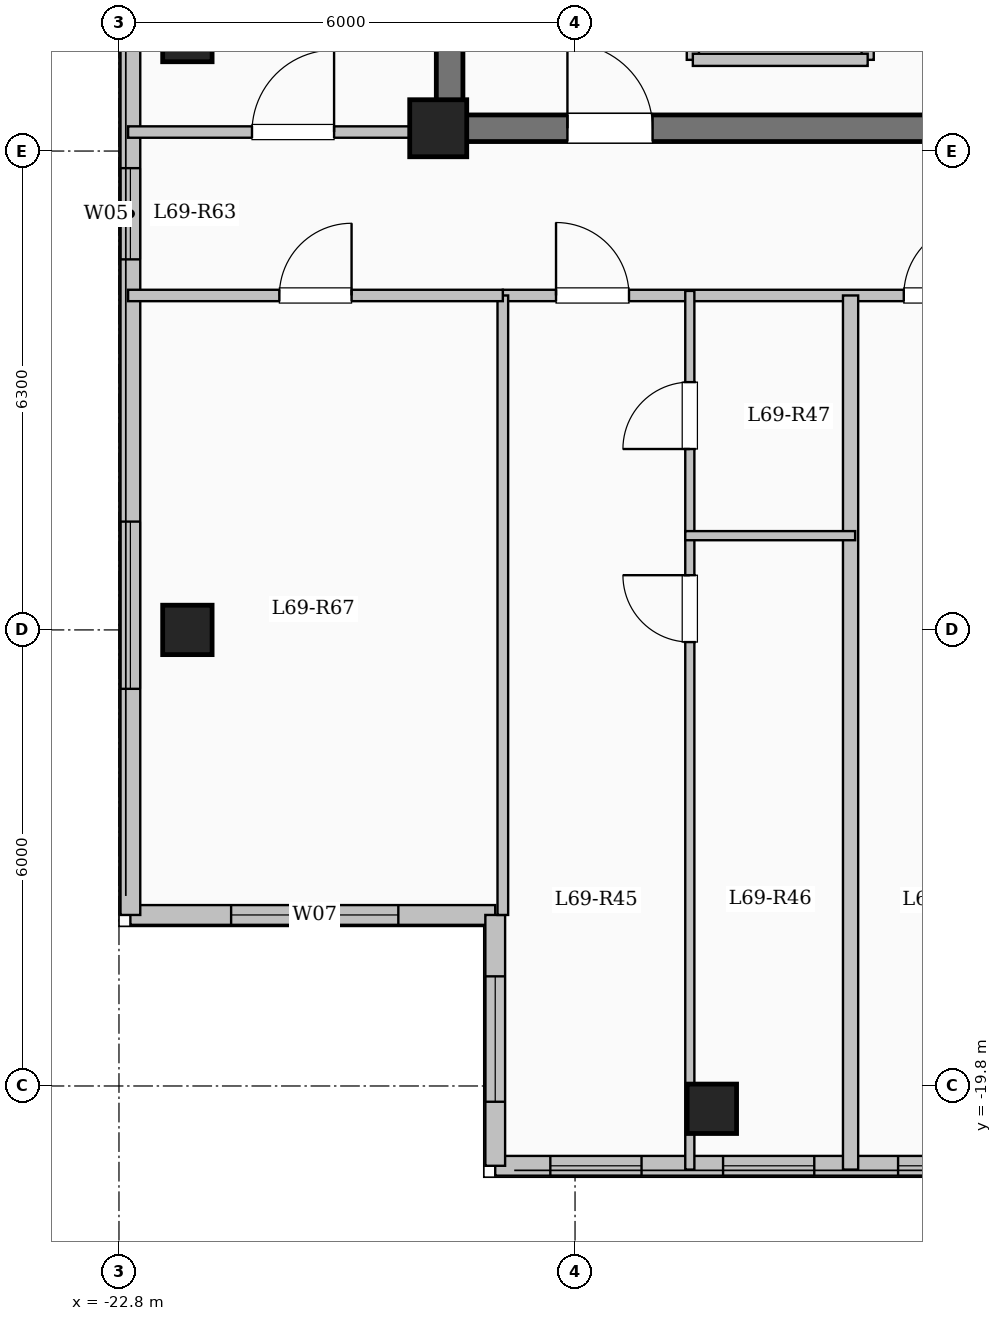
"""IFC4 building model, lengths in metres.
Left out: names, types, materials, properties, quantities, classifications, styles, units other than length and angle.
Written with IfcOpenShell. Run it as: python <this file> out.ifc"""

import sys

from ifc_helpers import new_model, si_unit, direction, frame, frame_2d, origin, origin_2d, place, context, subcontext, project, spatial, rectangle, extrude, element, fill, save


model = new_model("IFC4")
c1 = context("Model", 3, precision=1e-05, world=origin(), true_north=direction((0.0, 1.0)))
c2 = subcontext(c1, "Body", "Model", "MODEL_VIEW")
j1 = project(units=[si_unit("LENGTHUNIT", "METRE"), si_unit("PLANEANGLEUNIT", "RADIAN")], contexts=[c1])
p1 = place(None, origin())
s1 = spatial("IfcSite", under=j1, at=p1, CompositionType="ELEMENT")
p2 = place(p1, origin())
s2 = spatial("IfcBuilding", under=s1, at=p2, CompositionType="ELEMENT")
p3 = place(p2, frame((0.0, 0.0, 254.9)))
s3 = spatial("IfcBuildingStorey", under=s2, at=p3, CompositionType="ELEMENT", Elevation=254.9)
p4 = place(p3, frame((-18.6, -7.2, 0.0), z_axis=(0.0, 0.0, 1.0), x_axis=(1.0, 0.0, 0.0)))
e1 = element("IfcColumn", 1, at=p4, inside=s3, PredefinedType="COLUMN", context=c2, shape_type="SweptSolid", body=[
    extrude(rectangle(XDim=0.75, YDim=0.75, at=origin_2d()), origin(), (0.0, 0.0, 1.0), 3.35),
])
for number, where, z_axis, x_axis in (
    (2, (-15.0, -20.1, 0.0), (0.0, 0.0, 1.0), (1.0, 0.0, 0.0)),
    (3, (-21.9, -13.8, 0.0), (0.0, 0.0, 1.0), (1.0, 0.0, 0.0)),
    (4, (-21.9, -6.0, 0.0), (0.0, 0.0, 1.0), (1.0, 0.0, 0.0)),
):
    element("IfcColumn", number, at=place(p3, frame(where, z_axis=z_axis, x_axis=x_axis)), inside=s3, PredefinedType="COLUMN", context=c2, shape_type="SweptSolid", body=[
        extrude(rectangle(XDim=0.65, YDim=0.65, at=origin_2d()), origin(), (0.0, 0.0, 1.0), 3.35),
    ])
p5 = place(p3, frame((-17.85, -17.55, 0.0), z_axis=(0.0, 0.0, 1.0), x_axis=(-1.0, 0.0, 0.0)))
e5 = element("IfcWall", 5, at=p5, inside=s3, PredefinedType="SOLIDWALL", context=c2, shape_type="SweptSolid", body=[
    extrude(rectangle(XDim=4.8, YDim=0.26, at=frame_2d((2.4, 0.0))), origin(), (0.0, 0.0, 1.0), 3.1),
])
p6 = place(p5, frame((1.275, 0.0, 0.9)))
e6 = element("IfcOpeningElement", 6, at=p6, cuts=e5, PredefinedType="OPENING", context=c2, shape_type="SweptSolid", body=[
    extrude(rectangle(XDim=2.2, YDim=1.75, at=frame_2d((1.1, 0.875))), frame((0.0, 0.14, 0.0), z_axis=(0.0, -1.0, 0.0), x_axis=(1.0, 0.0, 0.0)), (0.0, 0.0, 1.0), 0.28),
])
p7 = place(p3, frame((-22.65, -17.55, 0.0), z_axis=(0.0, 0.0, 1.0), x_axis=(0.0, 1.0, 0.0)))
e7 = element("IfcWall", 7, at=p7, inside=s3, PredefinedType="SOLIDWALL", context=c2, shape_type="SweptSolid", body=[
    extrude(rectangle(XDim=35.1, YDim=0.26, at=frame_2d((17.55, 0.0))), origin(), (0.0, 0.0, 1.0), 3.1),
])
p8 = place(p7, frame((2.975, 0.0, 0.9)))
e8 = element("IfcOpeningElement", 8, at=p8, cuts=e7, PredefinedType="OPENING", context=c2, shape_type="SweptSolid", body=[
    extrude(rectangle(XDim=2.2, YDim=1.75, at=frame_2d((1.1, 0.875))), frame((0.0, 0.14, 0.0), z_axis=(0.0, -1.0, 0.0), x_axis=(1.0, 0.0, 0.0)), (0.0, 0.0, 1.0), 0.28),
])
p9 = place(p7, frame((8.625, 0.0, 0.95)))
e9 = element("IfcOpeningElement", 9, at=p9, cuts=e7, PredefinedType="OPENING", context=c2, shape_type="SweptSolid", body=[
    extrude(rectangle(XDim=1.2, YDim=1.5, at=frame_2d((0.6, 0.75))), frame((0.0, 0.14, 0.0), z_axis=(0.0, -1.0, 0.0), x_axis=(1.0, 0.0, 0.0)), (0.0, 0.0, 1.0), 0.28),
])
p10 = place(p7, frame((18.3, 0.0, 0.9)))
e10 = element("IfcOpeningElement", 10, at=p10, cuts=e7, PredefinedType="OPENING", context=c2, shape_type="SweptSolid", body=[
    extrude(rectangle(XDim=2.0, YDim=1.7, at=frame_2d((1.0, 0.85))), frame((0.0, 0.14, 0.0), z_axis=(0.0, -1.0, 0.0), x_axis=(1.0, 0.0, 0.0)), (0.0, 0.0, 1.0), 0.28),
])
p11 = place(p7, frame((28.675, 0.0, 0.95)))
e11 = element("IfcOpeningElement", 11, at=p11, cuts=e7, PredefinedType="OPENING", context=c2, shape_type="SweptSolid", body=[
    extrude(rectangle(XDim=1.0, YDim=1.5, at=frame_2d((0.5, 0.75))), frame((0.0, 0.14, 0.0), z_axis=(0.0, -1.0, 0.0), x_axis=(1.0, 0.0, 0.0)), (0.0, 0.0, 1.0), 0.28),
])
p12 = place(p7, frame((31.6, 0.0, 0.9)))
e12 = element("IfcOpeningElement", 12, at=p12, cuts=e7, PredefinedType="OPENING", context=c2, shape_type="SweptSolid", body=[
    extrude(rectangle(XDim=2.0, YDim=1.7, at=frame_2d((1.0, 0.85))), frame((0.0, 0.14, 0.0), z_axis=(0.0, -1.0, 0.0), x_axis=(1.0, 0.0, 0.0)), (0.0, 0.0, 1.0), 0.28),
])
p13 = place(p3, frame((-7.35, -20.85, 0.0), z_axis=(0.0, 0.0, 1.0), x_axis=(-1.0, 0.0, 0.0)))
e13 = element("IfcWall", 13, at=p13, inside=s3, PredefinedType="SOLIDWALL", context=c2, shape_type="SweptSolid", body=[
    extrude(rectangle(XDim=10.5, YDim=0.26, at=frame_2d((5.25, 0.0))), origin(), (0.0, 0.0, 1.0), 3.1),
])
p14 = place(p13, frame((0.145, 0.0, 0.95)))
e14 = element("IfcOpeningElement", 14, at=p14, cuts=e13, PredefinedType="OPENING", context=c2, shape_type="SweptSolid", body=[
    extrude(rectangle(XDim=0.85, YDim=1.5, at=frame_2d((0.425, 0.75))), frame((0.0, 0.14, 0.0), z_axis=(0.0, -1.0, 0.0), x_axis=(1.0, 0.0, 0.0)), (0.0, 0.0, 1.0), 0.28),
])
p15 = place(p13, frame((1.677, 0.0, 0.95)))
e15 = element("IfcOpeningElement", 15, at=p15, cuts=e13, PredefinedType="OPENING", context=c2, shape_type="SweptSolid", body=[
    extrude(rectangle(XDim=1.2, YDim=1.5, at=frame_2d((0.6, 0.75))), frame((0.0, 0.14, 0.0), z_axis=(0.0, -1.0, 0.0), x_axis=(1.0, 0.0, 0.0)), (0.0, 0.0, 1.0), 0.28),
])
p16 = place(p13, frame((4.0, 0.0, 0.95)))
e16 = element("IfcOpeningElement", 16, at=p16, cuts=e13, PredefinedType="OPENING", context=c2, shape_type="SweptSolid", body=[
    extrude(rectangle(XDim=1.2, YDim=1.5, at=frame_2d((0.6, 0.75))), frame((0.0, 0.14, 0.0), z_axis=(0.0, -1.0, 0.0), x_axis=(1.0, 0.0, 0.0)), (0.0, 0.0, 1.0), 0.28),
])
p17 = place(p13, frame((6.302, 0.0, 0.95)))
e17 = element("IfcOpeningElement", 17, at=p17, cuts=e13, PredefinedType="OPENING", context=c2, shape_type="SweptSolid", body=[
    extrude(rectangle(XDim=1.2, YDim=1.5, at=frame_2d((0.6, 0.75))), frame((0.0, 0.14, 0.0), z_axis=(0.0, -1.0, 0.0), x_axis=(1.0, 0.0, 0.0)), (0.0, 0.0, 1.0), 0.28),
])
p18 = place(p13, frame((8.575, 0.0, 0.95)))
e18 = element("IfcOpeningElement", 18, at=p18, cuts=e13, PredefinedType="OPENING", context=c2, shape_type="SweptSolid", body=[
    extrude(rectangle(XDim=1.2, YDim=1.5, at=frame_2d((0.6, 0.75))), frame((0.0, 0.14, 0.0), z_axis=(0.0, -1.0, 0.0), x_axis=(1.0, 0.0, 0.0)), (0.0, 0.0, 1.0), 0.28),
])
p19 = place(p3, frame((-17.85, -20.85, 0.0), z_axis=(0.0, 0.0, 1.0), x_axis=(0.0, 1.0, 0.0)))
e19 = element("IfcWall", 19, at=p19, inside=s3, PredefinedType="SOLIDWALL", context=c2, shape_type="SweptSolid", body=[
    extrude(rectangle(XDim=3.3, YDim=0.26, at=frame_2d((1.65, 0.0))), origin(), (0.0, 0.0, 1.0), 3.1),
])
p20 = place(p19, frame((0.843, 0.0, 0.9)))
e20 = element("IfcOpeningElement", 20, at=p20, cuts=e19, PredefinedType="OPENING", context=c2, shape_type="SweptSolid", body=[
    extrude(rectangle(XDim=1.65, YDim=1.6, at=frame_2d((0.825, 0.8))), frame((0.0, 0.14, 0.0), z_axis=(0.0, -1.0, 0.0), x_axis=(1.0, 0.0, 0.0)), (0.0, 0.0, 1.0), 0.28),
])
p21 = place(p3, frame((-15.25, -6.3, 0.0), z_axis=(0.0, 0.0, 1.0), x_axis=(0.0, 1.0, 0.0)))
e21 = element("IfcWall", 21, at=p21, inside=s3, PredefinedType="SOLIDWALL", context=c2, shape_type="SweptSolid", body=[
    extrude(rectangle(XDim=2.6, YDim=0.16, at=frame_2d((1.3, 0.0))), origin(), (0.0, 0.0, 1.0), 3.1),
])
p22 = place(p21, frame((0.75, 0.0, 0.0)))
e22 = element("IfcOpeningElement", 22, at=p22, cuts=e21, PredefinedType="OPENING", context=c2, shape_type="SweptSolid", body=[
    extrude(rectangle(XDim=1.1, YDim=2.15, at=frame_2d((0.55, 1.075))), frame((0.0, 0.09, 0.0), z_axis=(0.0, -1.0, 0.0), x_axis=(1.0, 0.0, 0.0)), (0.0, 0.0, 1.0), 0.18),
])
p23 = place(p3, frame((-12.95, -6.3, 0.0), z_axis=(0.0, 0.0, 1.0), x_axis=(0.0, 1.0, 0.0)))
e23 = element("IfcWall", 23, at=p23, inside=s3, PredefinedType="SOLIDWALL", context=c2, shape_type="SweptSolid", body=[
    extrude(rectangle(XDim=2.6, YDim=0.16, at=frame_2d((1.3, 0.0))), origin(), (0.0, 0.0, 1.0), 3.1),
])
p24 = place(p3, frame((-15.25, -6.3, 0.0), z_axis=(0.0, 0.0, 1.0), x_axis=(1.0, 0.0, 0.0)))
e24 = element("IfcWall", 24, at=p24, inside=s3, PredefinedType="SOLIDWALL", context=c2, shape_type="SweptSolid", body=[
    extrude(rectangle(XDim=2.3, YDim=0.16, at=frame_2d((1.15, 0.0))), origin(), (0.0, 0.0, 1.0), 3.1),
])
p25 = place(p3, frame((-18.45, -7.375, 0.0), z_axis=(0.0, 0.0, 1.0), x_axis=(0.0, 1.0, 0.0)))
e25 = element("IfcWall", 25, at=p25, inside=s3, PredefinedType="SHEAR", context=c2, shape_type="SweptSolid", body=[
    extrude(rectangle(XDim=14.05, YDim=0.35, at=frame_2d((7.025, 0.0))), origin(), (0.0, 0.0, 1.0), 3.35),
])
p26 = place(p3, frame((-18.625, -7.2, 0.0), z_axis=(0.0, 0.0, 1.0), x_axis=(1.0, 0.0, 0.0)))
e26 = element("IfcWall", 26, at=p26, inside=s3, PredefinedType="SHEAR", context=c2, shape_type="SweptSolid", body=[
    extrude(rectangle(XDim=8.55, YDim=0.35, at=frame_2d((4.275, 0.0))), origin(), (0.0, 0.0, 1.0), 3.35),
])
p27 = place(p26, frame((1.725, 0.0, 0.0)))
e27 = element("IfcOpeningElement", 27, at=p27, cuts=e26, PredefinedType="OPENING", context=c2, shape_type="SweptSolid", body=[
    extrude(rectangle(XDim=1.12, YDim=2.15, at=frame_2d((0.56, 1.075))), frame((0.0, 0.185, 0.0), z_axis=(0.0, -1.0, 0.0), x_axis=(1.0, 0.0, 0.0)), (0.0, 0.0, 1.0), 0.37),
])
p28 = place(p3, frame((-17.75, -9.4, 0.0), z_axis=(0.0, 0.0, 1.0), x_axis=(1.0, 0.0, 0.0)))
e28 = element("IfcWall", 28, at=p28, inside=s3, PredefinedType="PARTITIONING", context=c2, shape_type="SweptSolid", body=[
    extrude(rectangle(XDim=9.2, YDim=0.15, at=frame_2d((4.6, 0.0))), origin(), (0.0, 0.0, 1.0), 3.1),
])
p29 = place(p28, frame((0.7, 0.0, 0.0)))
e29 = element("IfcOpeningElement", 29, at=p29, cuts=e28, PredefinedType="OPENING", context=c2, shape_type="SweptSolid", body=[
    extrude(rectangle(XDim=0.96, YDim=2.15, at=frame_2d((0.48, 1.075))), frame((0.0, 0.085, 0.0), z_axis=(0.0, -1.0, 0.0), x_axis=(1.0, 0.0, 0.0)), (0.0, 0.0, 1.0), 0.17),
])
p30 = place(p28, frame((5.275, 0.0, 0.0)))
e30 = element("IfcOpeningElement", 30, at=p30, cuts=e28, PredefinedType="OPENING", context=c2, shape_type="SweptSolid", body=[
    extrude(rectangle(XDim=0.96, YDim=2.15, at=frame_2d((0.48, 1.075))), frame((0.0, 0.085, 0.0), z_axis=(0.0, -1.0, 0.0), x_axis=(1.0, 0.0, 0.0)), (0.0, 0.0, 1.0), 0.17),
])
p31 = place(p3, frame((-13.175, -20.9, 0.0), z_axis=(0.0, 0.0, 1.0), x_axis=(0.0, 1.0, 0.0)))
e31 = element("IfcWall", 31, at=p31, inside=s3, PredefinedType="SOLIDWALL", context=c2, shape_type="SweptSolid", body=[
    extrude(rectangle(XDim=11.5, YDim=0.2, at=frame_2d((5.75, 0.0))), origin(), (0.0, 0.0, 1.0), 3.1),
])
p32 = place(p3, frame((-15.29, -20.9, 0.0), z_axis=(0.0, 0.0, 1.0), x_axis=(0.0, 1.0, 0.0)))
e32 = element("IfcWall", 32, at=p32, inside=s3, PredefinedType="PARTITIONING", context=c2, shape_type="SweptSolid", body=[
    extrude(rectangle(XDim=8.34, YDim=0.12, at=frame_2d((4.17, 0.0))), origin(), (0.0, 0.0, 1.0), 2.685),
])
p33 = place(p32, frame((6.94, 0.0, 0.0)))
e33 = element("IfcOpeningElement", 33, at=p33, cuts=e32, PredefinedType="OPENING", context=c2, shape_type="SweptSolid", body=[
    extrude(rectangle(XDim=0.88, YDim=2.1, at=frame_2d((0.44, 1.05))), frame((0.0, 0.07, 0.0), z_axis=(0.0, -1.0, 0.0), x_axis=(1.0, 0.0, 0.0)), (0.0, 0.0, 1.0), 0.14),
])
p34 = place(p3, frame((-15.29, -12.56, 0.0), z_axis=(0.0, 0.0, 1.0), x_axis=(0.0, 1.0, 0.0)))
e34 = element("IfcWall", 34, at=p34, inside=s3, PredefinedType="PARTITIONING", context=c2, shape_type="SweptSolid", body=[
    extrude(rectangle(XDim=3.22, YDim=0.12, at=frame_2d((1.61, 0.0))), origin(), (0.0, 0.0, 1.0), 2.685),
])
p35 = place(p34, frame((1.14, 0.0, 0.0)))
e35 = element("IfcOpeningElement", 35, at=p35, cuts=e34, PredefinedType="OPENING", context=c2, shape_type="SweptSolid", body=[
    extrude(rectangle(XDim=0.88, YDim=2.1, at=frame_2d((0.44, 1.05))), frame((0.0, 0.07, 0.0), z_axis=(0.0, -1.0, 0.0), x_axis=(1.0, 0.0, 0.0)), (0.0, 0.0, 1.0), 0.14),
])
p36 = place(p3, frame((-15.35, -12.56, 0.0), z_axis=(0.0, 0.0, 1.0), x_axis=(1.0, 0.0, 0.0)))
e36 = element("IfcWall", 36, at=p36, inside=s3, PredefinedType="PARTITIONING", context=c2, shape_type="SweptSolid", body=[
    extrude(rectangle(XDim=2.235, YDim=0.12, at=frame_2d((1.118, 0.0))), origin(), (0.0, 0.0, 1.0), 2.785),
])
p37 = place(p3, frame((-22.68, -7.25, 0.0), z_axis=(0.0, 0.0, 1.0), x_axis=(1.0, 0.0, 0.0)))
e37 = element("IfcWall", 37, at=p37, inside=s3, PredefinedType="PARTITIONING", context=c2, shape_type="SweptSolid", body=[
    extrude(rectangle(XDim=4.23, YDim=0.15, at=frame_2d((2.115, 0.0))), origin(), (0.0, 0.0, 1.0), 3.1),
])
p38 = place(p37, frame((1.63, 0.0, 0.0)))
e38 = element("IfcOpeningElement", 38, at=p38, cuts=e37, PredefinedType="OPENING", context=c2, shape_type="SweptSolid", body=[
    extrude(rectangle(XDim=1.08, YDim=2.15, at=frame_2d((0.54, 1.075))), frame((0.0, 0.085, 0.0), z_axis=(0.0, -1.0, 0.0), x_axis=(1.0, 0.0, 0.0)), (0.0, 0.0, 1.0), 0.17),
])
p39 = place(p3, frame((-17.75, -17.55, 0.0), z_axis=(0.0, 0.0, 1.0), x_axis=(0.0, 1.0, 0.0)))
e39 = element("IfcWall", 39, at=p39, inside=s3, PredefinedType="PARTITIONING", context=c2, shape_type="SweptSolid", body=[
    extrude(rectangle(XDim=8.15, YDim=0.14, at=frame_2d((4.075, 0.0))), origin(), (0.0, 0.0, 1.0), 3.1),
])
p40 = place(p3, frame((-22.68, -9.4, 0.0), z_axis=(0.0, 0.0, 1.0), x_axis=(1.0, 0.0, 0.0)))
e40 = element("IfcWall", 40, at=p40, inside=s3, PredefinedType="PARTITIONING", context=c2, shape_type="SweptSolid", body=[
    extrude(rectangle(XDim=4.93, YDim=0.15, at=frame_2d((2.465, 0.0))), origin(), (0.0, 0.0, 1.0), 3.1),
])
p41 = place(p40, frame((1.99, 0.0, 0.0)))
e41 = element("IfcOpeningElement", 41, at=p41, cuts=e40, PredefinedType="OPENING", context=c2, shape_type="SweptSolid", body=[
    extrude(rectangle(XDim=0.95, YDim=2.15, at=frame_2d((0.475, 1.075))), frame((0.0, 0.085, 0.0), z_axis=(0.0, -1.0, 0.0), x_axis=(1.0, 0.0, 0.0)), (0.0, 0.0, 1.0), 0.17),
])
p42 = place(p6, origin())
e42 = element("IfcWindow", 42, at=p42, inside=s3, PartitioningType="SINGLE_PANEL", PredefinedType="WINDOW", context=c2, shape_type="SweptSolid", body=[
    extrude(rectangle(XDim=2.2, YDim=1.75, at=frame_2d((1.1, 0.875))), frame((0.0, 0.03, 0.0), z_axis=(0.0, -1.0, 0.0), x_axis=(1.0, 0.0, 0.0)), (0.0, 0.0, 1.0), 0.06),
])
fill(e6, e42)
p43 = place(p8, origin())
e43 = element("IfcWindow", 43, at=p43, inside=s3, PartitioningType="SINGLE_PANEL", PredefinedType="WINDOW", context=c2, shape_type="SweptSolid", body=[
    extrude(rectangle(XDim=2.2, YDim=1.75, at=frame_2d((1.1, 0.875))), frame((0.0, 0.03, 0.0), z_axis=(0.0, -1.0, 0.0), x_axis=(1.0, 0.0, 0.0)), (0.0, 0.0, 1.0), 0.06),
])
fill(e8, e43)
p44 = place(p9, origin())
e44 = element("IfcWindow", 44, at=p44, inside=s3, PartitioningType="SINGLE_PANEL", PredefinedType="WINDOW", context=c2, shape_type="SweptSolid", body=[
    extrude(rectangle(XDim=1.2, YDim=1.5, at=frame_2d((0.6, 0.75))), frame((0.0, 0.03, 0.0), z_axis=(0.0, -1.0, 0.0), x_axis=(1.0, 0.0, 0.0)), (0.0, 0.0, 1.0), 0.06),
])
fill(e9, e44)
p45 = place(p16, origin())
e45 = element("IfcWindow", 45, at=p45, inside=s3, PartitioningType="SINGLE_PANEL", PredefinedType="WINDOW", context=c2, shape_type="SweptSolid", body=[
    extrude(rectangle(XDim=1.2, YDim=1.5, at=frame_2d((0.6, 0.75))), frame((0.0, 0.03, 0.0), z_axis=(0.0, -1.0, 0.0), x_axis=(1.0, 0.0, 0.0)), (0.0, 0.0, 1.0), 0.06),
])
fill(e16, e45)
p46 = place(p17, origin())
e46 = element("IfcWindow", 46, at=p46, inside=s3, PartitioningType="SINGLE_PANEL", PredefinedType="WINDOW", context=c2, shape_type="SweptSolid", body=[
    extrude(rectangle(XDim=1.2, YDim=1.5, at=frame_2d((0.6, 0.75))), frame((0.0, 0.03, 0.0), z_axis=(0.0, -1.0, 0.0), x_axis=(1.0, 0.0, 0.0)), (0.0, 0.0, 1.0), 0.06),
])
fill(e17, e46)
p47 = place(p18, origin())
e47 = element("IfcWindow", 47, at=p47, inside=s3, PartitioningType="SINGLE_PANEL", PredefinedType="WINDOW", context=c2, shape_type="SweptSolid", body=[
    extrude(rectangle(XDim=1.2, YDim=1.5, at=frame_2d((0.6, 0.75))), frame((0.0, 0.03, 0.0), z_axis=(0.0, -1.0, 0.0), x_axis=(1.0, 0.0, 0.0)), (0.0, 0.0, 1.0), 0.06),
])
fill(e18, e47)
p48 = place(p20, origin())
e48 = element("IfcWindow", 48, at=p48, inside=s3, PartitioningType="SINGLE_PANEL", PredefinedType="WINDOW", context=c2, shape_type="SweptSolid", body=[
    extrude(rectangle(XDim=1.65, YDim=1.6, at=frame_2d((0.825, 0.8))), frame((0.0, 0.03, 0.0), z_axis=(0.0, -1.0, 0.0), x_axis=(1.0, 0.0, 0.0)), (0.0, 0.0, 1.0), 0.06),
])
fill(e20, e48)
p49 = place(p27, origin())
e49 = element("IfcDoor", 49, at=p49, inside=s3, OperationType="SINGLE_SWING_LEFT", PredefinedType="DOOR", context=c2, shape_type="SweptSolid", body=[
    extrude(rectangle(XDim=1.12, YDim=2.15, at=frame_2d((0.56, 1.075))), frame((0.0, 0.025, 0.0), z_axis=(0.0, -1.0, 0.0), x_axis=(1.0, 0.0, 0.0)), (0.0, 0.0, 1.0), 0.05),
])
fill(e27, e49)
p50 = place(p29, origin())
e50 = element("IfcDoor", 50, at=p50, inside=s3, OperationType="SINGLE_SWING_LEFT", PredefinedType="DOOR", context=c2, shape_type="SweptSolid", body=[
    extrude(rectangle(XDim=0.96, YDim=2.15, at=frame_2d((0.48, 1.075))), frame((0.0, 0.025, 0.0), z_axis=(0.0, -1.0, 0.0), x_axis=(1.0, 0.0, 0.0)), (0.0, 0.0, 1.0), 0.05),
])
fill(e29, e50)
p51 = place(p33, origin())
e51 = element("IfcDoor", 51, at=p51, inside=s3, OperationType="SINGLE_SWING_RIGHT", PredefinedType="DOOR", context=c2, shape_type="SweptSolid", body=[
    extrude(rectangle(XDim=0.88, YDim=2.1, at=frame_2d((0.44, 1.05))), frame((0.0, 0.025, 0.0), z_axis=(0.0, -1.0, 0.0), x_axis=(1.0, 0.0, 0.0)), (0.0, 0.0, 1.0), 0.05),
])
fill(e33, e51)
p52 = place(p35, origin())
e52 = element("IfcDoor", 52, at=p52, inside=s3, OperationType="SINGLE_SWING_LEFT", PredefinedType="DOOR", context=c2, shape_type="SweptSolid", body=[
    extrude(rectangle(XDim=0.88, YDim=2.1, at=frame_2d((0.44, 1.05))), frame((0.0, 0.025, 0.0), z_axis=(0.0, -1.0, 0.0), x_axis=(1.0, 0.0, 0.0)), (0.0, 0.0, 1.0), 0.05),
])
fill(e35, e52)
p53 = place(p30, origin())
e53 = element("IfcDoor", 53, at=p53, inside=s3, OperationType="SINGLE_SWING_RIGHT", PredefinedType="DOOR", context=c2, shape_type="SweptSolid", body=[
    extrude(rectangle(XDim=0.96, YDim=2.15, at=frame_2d((0.48, 1.075))), frame((0.0, 0.025, 0.0), z_axis=(0.0, -1.0, 0.0), x_axis=(1.0, 0.0, 0.0)), (0.0, 0.0, 1.0), 0.05),
])
fill(e30, e53)
p54 = place(p41, origin())
e54 = element("IfcDoor", 54, at=p54, inside=s3, OperationType="SINGLE_SWING_RIGHT", PredefinedType="DOOR", context=c2, shape_type="SweptSolid", body=[
    extrude(rectangle(XDim=0.95, YDim=2.15, at=frame_2d((0.475, 1.075))), frame((0.0, 0.025, 0.0), z_axis=(0.0, -1.0, 0.0), x_axis=(1.0, 0.0, 0.0)), (0.0, 0.0, 1.0), 0.05),
])
fill(e41, e54)
p55 = place(p38, origin())
e55 = element("IfcDoor", 55, at=p55, inside=s3, OperationType="SINGLE_SWING_RIGHT", PredefinedType="DOOR", context=c2, shape_type="SweptSolid", body=[
    extrude(rectangle(XDim=1.08, YDim=2.15, at=frame_2d((0.54, 1.075))), frame((0.0, 0.025, 0.0), z_axis=(0.0, -1.0, 0.0), x_axis=(1.0, 0.0, 0.0)), (0.0, 0.0, 1.0), 0.05),
])
fill(e38, e55)
save(model, sys.argv[1])
